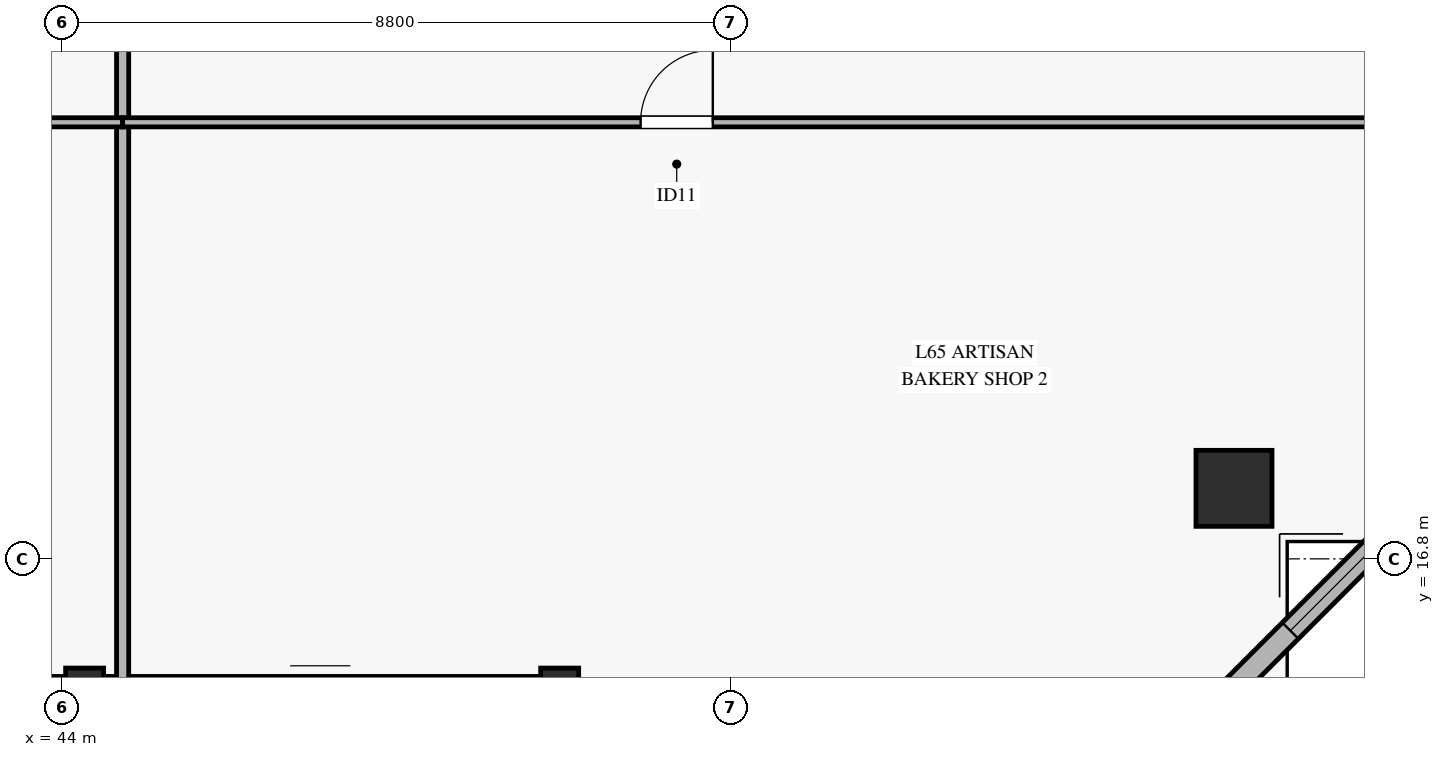
"""IFC4 building model, lengths in metres.
Left out: names, types, materials, properties, quantities, classifications, styles, units other than length and angle.
Written with IfcOpenShell. Run it as: python <this file> out.ifc"""

import sys

from ifc_helpers import new_model, si_unit, direction, frame, frame_2d, origin, origin_2d, place, context, subcontext, project, spatial, rectangle, hollow_rectangle, extrude, source, transform, mapped, element, fill, save


model = new_model("IFC4")
c1 = context("Model", 3, precision=1e-05, world=origin(), true_north=direction((0.0, 1.0)))
c2 = subcontext(c1, "Body", "Model", "MODEL_VIEW")
j1 = project(units=[si_unit("LENGTHUNIT", "METRE"), si_unit("PLANEANGLEUNIT", "RADIAN")], contexts=[c1])
p1 = place(None, origin())
s1 = spatial("IfcSite", under=j1, at=p1, CompositionType="ELEMENT")
p2 = place(p1, origin())
s2 = spatial("IfcBuilding", under=s1, at=p2, CompositionType="ELEMENT")
p3 = place(p2, frame((0.0, 0.0, 255.3)))
s3 = spatial("IfcBuildingStorey", under=s2, at=p3, CompositionType="ELEMENT", Elevation=255.3)
m1 = source(origin(), c2, "Body", "SweptSolid", [
    extrude(hollow_rectangle(XDim=1.0, YDim=1.0, WallThickness=0.045, at=origin_2d()), origin(), (0.0, 0.0, 1.0), 3.326),
])
p4 = place(p3, frame((59.422, 17.728, 0.0), z_axis=(-0.110968509205, 0.266339100467, 0.957470351252), x_axis=(-0.923084448442, -0.384597323242, 0.0)))
e1 = element("IfcColumn", 1, at=p4, inside=s3, PredefinedType="COLUMN", context=c2, shape_type="MappedRepresentation", body=[
    mapped(m1, transform((0.0, 0.0, 0.0), x_axis=(1.0, 0.0, 0.0), y_axis=(0.0, 1.0, 0.0), z_axis=(0.0, 0.0, 1.0), scale=1.0)),
])
m2 = source(origin(), c2, "Body", "SweptSolid", [
    extrude(hollow_rectangle(XDim=0.5, YDim=0.5, WallThickness=0.024, at=origin_2d()), origin(), (0.0, 0.0, 1.0), 3.319),
])
for number, where, z_axis, x_axis in (
    (2, (44.3, 15.113, 0.0), (0.0, 0.281, 0.96), (-1.0, 0.0, 0.0)),
    (3, (50.55, 15.113, 0.0), (0.0, 0.281, 0.96), (-1.0, 0.0, 0.0)),
):
    element("IfcColumn", number, at=place(p3, frame(where, z_axis=z_axis, x_axis=x_axis)), inside=s3, PredefinedType="COLUMN", context=c2, shape_type="MappedRepresentation", body=[
        mapped(m2, transform((0.0, 0.0, 0.0), x_axis=(1.0, 0.0, 0.0), y_axis=(0.0, 1.0, 0.0), z_axis=(0.0, 0.0, 1.0), scale=1.0)),
    ])
p5 = place(p3, frame((37.8, 15.113, 0.0), z_axis=(0.0, 0.0, 1.0), x_axis=(1.0, 0.0, 0.0)))
e4 = element("IfcWall", 4, at=p5, inside=s3, PredefinedType="SOLIDWALL", context=c2, shape_type="SweptSolid", body=[
    extrude(rectangle(XDim=6.25, YDim=0.28, at=frame_2d((3.125, 0.0))), origin(), (0.0, 0.0, 1.0), 2.815),
])
p6 = place(p3, frame((44.55, 15.113, 0.0), z_axis=(0.0, 0.0, 1.0), x_axis=(1.0, 0.0, 0.0)))
e5 = element("IfcWall", 5, at=p6, inside=s3, PredefinedType="SOLIDWALL", context=c2, shape_type="SweptSolid", body=[
    extrude(rectangle(XDim=5.75, YDim=0.28, at=frame_2d((2.875, 0.0))), origin(), (0.0, 0.0, 1.0), 2.815),
])
p7 = place(p6, frame((1.95, 0.0, 0.0)))
e6 = element("IfcOpeningElement", 6, at=p7, cuts=e5, PredefinedType="OPENING", context=c2, shape_type="SweptSolid", body=[
    extrude(rectangle(XDim=1.8, YDim=2.25, at=frame_2d((0.9, 1.125))), frame((0.0, 0.15, 0.0), z_axis=(0.0, -1.0, 0.0), x_axis=(1.0, 0.0, 0.0)), (0.0, 0.0, 1.0), 0.3),
])
p8 = place(p3, frame((59.422, 15.113, 0.0), z_axis=(0.0, 0.0, 1.0), x_axis=(0.707106781187, 0.707106781187, 0.0)))
e7 = element("IfcWall", 7, at=p8, inside=s3, PredefinedType="SOLIDWALL", context=c2, shape_type="SweptSolid", body=[
    extrude(rectangle(XDim=3.698, YDim=0.3, at=frame_2d((1.849, 0.0))), origin(), (0.0, 0.0, 1.0), 2.815),
])
p9 = place(p8, frame((1.049, 0.0, 0.45)))
e8 = element("IfcOpeningElement", 8, at=p9, cuts=e7, PredefinedType="OPENING", context=c2, shape_type="SweptSolid", body=[
    extrude(rectangle(XDim=1.6, YDim=2.0, at=frame_2d((0.8, 1.0))), frame((0.0, 0.16, 0.0), z_axis=(0.0, -1.0, 0.0), x_axis=(1.0, 0.0, 0.0)), (0.0, 0.0, 1.0), 0.32),
])
p10 = place(p3, frame((44.8, 15.113, 0.0), z_axis=(0.0, 0.0, 1.0), x_axis=(0.0, 1.0, 0.0)))
e9 = element("IfcWall", 9, at=p10, inside=s3, PredefinedType="PARTITIONING", context=c2, shape_type="SweptSolid", body=[
    extrude(rectangle(XDim=19.737, YDim=0.16, at=frame_2d((9.869, 0.0))), origin(), (0.0, 0.0, 1.0), 2.77),
])
p11 = place(p3, frame((33.4, 22.544, 0.0), z_axis=(0.0, 0.0, 1.0), x_axis=(1.0, 0.0, 0.0)))
e10 = element("IfcWall", 10, at=p11, inside=s3, PredefinedType="PARTITIONING", context=c2, shape_type="SweptSolid", body=[
    extrude(rectangle(XDim=11.4, YDim=0.12, at=frame_2d((5.7, 0.0))), origin(), (0.0, 0.0, 1.0), 2.47),
])
p12 = place(p11, frame((4.726, 0.0, 0.0)))
e11 = element("IfcOpeningElement", 11, at=p12, cuts=e10, PredefinedType="OPENING", context=c2, shape_type="SweptSolid", body=[
    extrude(rectangle(XDim=0.95, YDim=2.1, at=frame_2d((0.475, 1.05))), frame((0.0, 0.07, 0.0), z_axis=(0.0, -1.0, 0.0), x_axis=(1.0, 0.0, 0.0)), (0.0, 0.0, 1.0), 0.14),
])
p13 = place(p3, frame((44.8, 22.544, 0.0), z_axis=(0.0, 0.0, 1.0), x_axis=(1.0, 0.0, 0.0)))
e12 = element("IfcWall", 12, at=p13, inside=s3, PredefinedType="PARTITIONING", context=c2, shape_type="SweptSolid", body=[
    extrude(rectangle(XDim=17.237, YDim=0.12, at=frame_2d((8.619, 0.0))), origin(), (0.0, 0.0, 1.0), 2.47),
])
p14 = place(p13, frame((6.815, 0.0, 0.0)))
e13 = element("IfcOpeningElement", 13, at=p14, cuts=e12, PredefinedType="OPENING", context=c2, shape_type="SweptSolid", body=[
    extrude(rectangle(XDim=0.95, YDim=2.1, at=frame_2d((0.475, 1.05))), frame((0.0, 0.07, 0.0), z_axis=(0.0, -1.0, 0.0), x_axis=(1.0, 0.0, 0.0)), (0.0, 0.0, 1.0), 0.14),
])
m3 = source(origin(), c2, "Body", "SweptSolid", [
    extrude(rectangle(XDim=1.6, YDim=2.0, at=frame_2d((0.8, 1.0))), frame((0.0, 0.03, 0.0), z_axis=(0.0, -1.0, 0.0), x_axis=(1.0, 0.0, 0.0)), (0.0, 0.0, 1.0), 0.06),
])
p15 = place(p9, origin())
e14 = element("IfcWindow", 14, at=p15, inside=s3, PartitioningType="SINGLE_PANEL", PredefinedType="WINDOW", context=c2, shape_type="MappedRepresentation", body=[
    mapped(m3, transform((0.0, 0.0, 0.0), x_axis=(1.0, 0.0, 0.0), y_axis=(0.0, 1.0, 0.0), z_axis=(0.0, 0.0, 1.0), scale=1.0)),
])
fill(e8, e14)
m4 = source(origin(), c2, "Body", "SweptSolid", [
    extrude(rectangle(XDim=0.95, YDim=2.1, at=frame_2d((0.475, 1.05))), frame((0.0, 0.025, 0.0), z_axis=(0.0, -1.0, 0.0), x_axis=(1.0, 0.0, 0.0)), (0.0, 0.0, 1.0), 0.05),
])
p16 = place(p14, origin())
e15 = element("IfcDoor", 15, at=p16, inside=s3, OperationType="SINGLE_SWING_RIGHT", PredefinedType="DOOR", context=c2, shape_type="MappedRepresentation", body=[
    mapped(m4, transform((0.0, 0.0, 0.0), x_axis=(1.0, 0.0, 0.0), y_axis=(0.0, 1.0, 0.0), z_axis=(0.0, 0.0, 1.0), scale=1.0)),
])
fill(e13, e15)
save(model, sys.argv[1])
